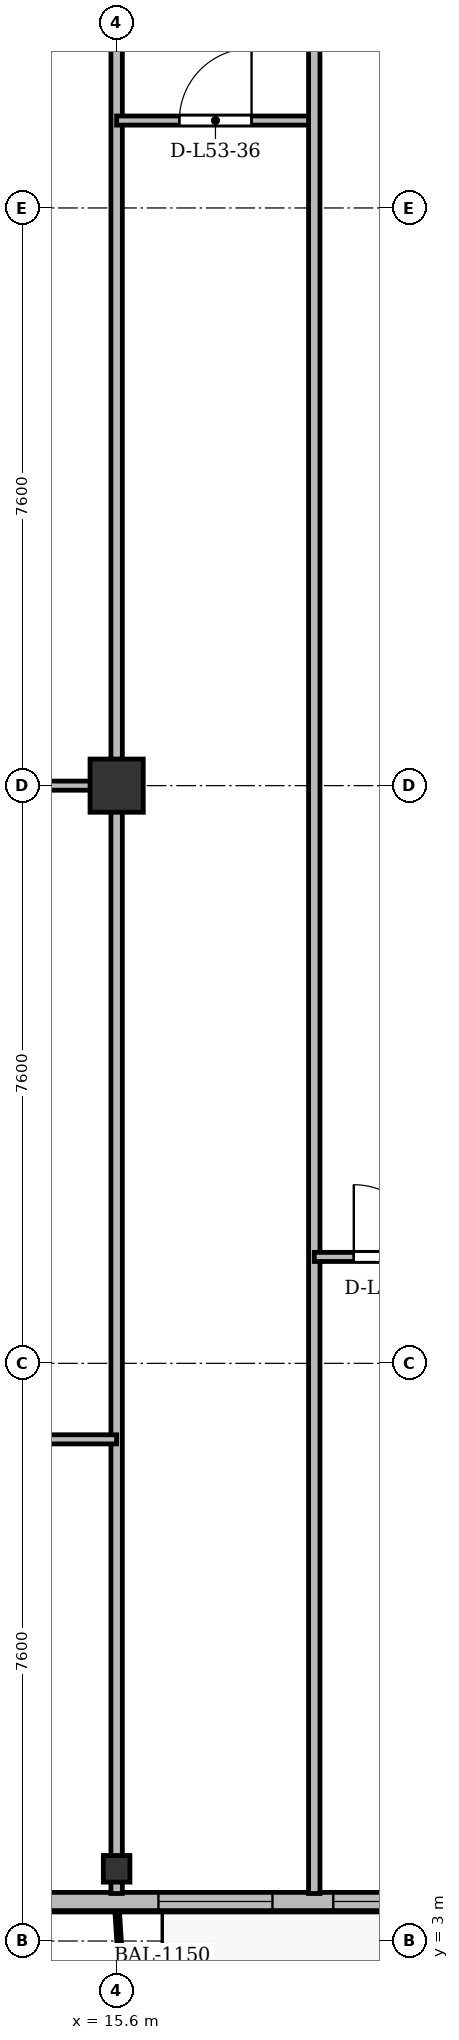
"""IFC4 building model, lengths in metres.
Left out: names, types, materials, properties, quantities, classifications, styles, units other than length and angle.
Written with IfcOpenShell. Run it as: python <this file> out.ifc"""

import sys

from ifc_helpers import new_model, si_unit, direction, frame, frame_2d, origin, origin_2d, place, context, subcontext, project, spatial, rectangle, i_section, extrude, source, transform, mapped, element, fill, save


model = new_model("IFC4")
c1 = context("Model", 3, precision=1e-05, world=origin(), true_north=direction((0.0, 1.0)))
c2 = subcontext(c1, "Body", "Model", "MODEL_VIEW")
j1 = project(units=[si_unit("LENGTHUNIT", "METRE"), si_unit("PLANEANGLEUNIT", "RADIAN")], contexts=[c1])
p1 = place(None, origin())
s1 = spatial("IfcSite", under=j1, at=p1, CompositionType="ELEMENT")
p2 = place(p1, origin())
s2 = spatial("IfcBuilding", under=s1, at=p2, CompositionType="ELEMENT")
p3 = place(p2, frame((0.0, 0.0, 204.9)))
s3 = spatial("IfcBuildingStorey", under=s2, at=p3, CompositionType="ELEMENT", Elevation=204.9)
m1 = source(origin(), c2, "Body", "SweptSolid", [
    extrude(i_section(OverallWidth=0.35, OverallDepth=0.35, WebThickness=0.018, FlangeThickness=0.028, at=origin_2d()), origin(), (0.0, 0.0, 1.0), 3.6),
])
p4 = place(p3, frame((15.6, 3.95, 0.0), z_axis=(0.0, 0.0, 1.0), x_axis=(1.0, 0.0, 0.0)))
e1 = element("IfcColumn", 1, at=p4, inside=s3, PredefinedType="COLUMN", context=c2, shape_type="MappedRepresentation", body=[
    mapped(m1, transform((0.0, 0.0, 0.0), x_axis=(1.0, 0.0, 0.0), y_axis=(0.0, 1.0, 0.0), z_axis=(0.0, 0.0, 1.0), scale=1.0)),
])
m2 = source(origin(), c2, "Body", "SweptSolid", [
    extrude(rectangle(XDim=0.7, YDim=0.7, at=origin_2d()), origin(), (0.0, 0.0, 1.0), 3.6),
])
p5 = place(p3, frame((15.6, 18.2, 0.0), z_axis=(0.0, 0.0, 1.0), x_axis=(1.0, 0.0, 0.0)))
e2 = element("IfcColumn", 2, at=p5, inside=s3, PredefinedType="COLUMN", context=c2, shape_type="MappedRepresentation", body=[
    mapped(m2, transform((0.0, 0.0, 0.0), x_axis=(1.0, 0.0, 0.0), y_axis=(0.0, 1.0, 0.0), z_axis=(0.0, 0.0, 1.0), scale=1.0)),
])
p6 = place(p3, frame((63.4, 3.52, 0.0), z_axis=(0.0, 0.0, 1.0), x_axis=(-1.0, 0.0, 0.0)))
e3 = element("IfcWall", 3, at=p6, inside=s3, PredefinedType="SOLIDWALL", context=c2, shape_type="SweptSolid", body=[
    extrude(rectangle(XDim=52.4, YDim=0.24, at=frame_2d((26.2, 0.0))), origin(), (0.0, 0.0, 1.0), 3.36),
])
p7 = place(p6, frame((1.345, 0.0, 0.9)))
e4 = element("IfcOpeningElement", 4, at=p7, cuts=e3, PredefinedType="OPENING", context=c2, shape_type="SweptSolid", body=[
    extrude(rectangle(XDim=2.0, YDim=1.95, at=frame_2d((1.0, 0.975))), frame((0.0, 0.13, 0.0), z_axis=(0.0, -1.0, 0.0), x_axis=(1.0, 0.0, 0.0)), (0.0, 0.0, 1.0), 0.26),
])
p8 = place(p6, frame((5.075, 0.0, 0.9)))
e5 = element("IfcOpeningElement", 5, at=p8, cuts=e3, PredefinedType="OPENING", context=c2, shape_type="SweptSolid", body=[
    extrude(rectangle(XDim=1.65, YDim=1.85, at=frame_2d((0.825, 0.925))), frame((0.0, 0.13, 0.0), z_axis=(0.0, -1.0, 0.0), x_axis=(1.0, 0.0, 0.0)), (0.0, 0.0, 1.0), 0.26),
])
p9 = place(p6, frame((7.45, 0.0, 0.9)))
e6 = element("IfcOpeningElement", 6, at=p9, cuts=e3, PredefinedType="OPENING", context=c2, shape_type="SweptSolid", body=[
    extrude(rectangle(XDim=1.5, YDim=1.75, at=frame_2d((0.75, 0.875))), frame((0.0, 0.13, 0.0), z_axis=(0.0, -1.0, 0.0), x_axis=(1.0, 0.0, 0.0)), (0.0, 0.0, 1.0), 0.26),
])
p10 = place(p6, frame((9.7, 0.0, 0.9)))
e7 = element("IfcOpeningElement", 7, at=p10, cuts=e3, PredefinedType="OPENING", context=c2, shape_type="SweptSolid", body=[
    extrude(rectangle(XDim=2.2, YDim=1.8, at=frame_2d((1.1, 0.9))), frame((0.0, 0.13, 0.0), z_axis=(0.0, -1.0, 0.0), x_axis=(1.0, 0.0, 0.0)), (0.0, 0.0, 1.0), 0.26),
])
p11 = place(p6, frame((14.217, 0.0, 0.0)))
e8 = element("IfcOpeningElement", 8, at=p11, cuts=e3, PredefinedType="OPENING", context=c2, shape_type="SweptSolid", body=[
    extrude(rectangle(XDim=1.2, YDim=2.2, at=frame_2d((0.6, 1.1))), frame((0.0, 0.13, 0.0), z_axis=(0.0, -1.0, 0.0), x_axis=(1.0, 0.0, 0.0)), (0.0, 0.0, 1.0), 0.26),
])
p12 = place(p6, frame((19.934, 0.0, 0.9)))
e9 = element("IfcOpeningElement", 9, at=p12, cuts=e3, PredefinedType="OPENING", context=c2, shape_type="SweptSolid", body=[
    extrude(rectangle(XDim=2.0, YDim=1.95, at=frame_2d((1.0, 0.975))), frame((0.0, 0.13, 0.0), z_axis=(0.0, -1.0, 0.0), x_axis=(1.0, 0.0, 0.0)), (0.0, 0.0, 1.0), 0.26),
])
p13 = place(p6, frame((22.775, 0.0, 0.9)))
e10 = element("IfcOpeningElement", 10, at=p13, cuts=e3, PredefinedType="OPENING", context=c2, shape_type="SweptSolid", body=[
    extrude(rectangle(XDim=1.65, YDim=1.85, at=frame_2d((0.825, 0.925))), frame((0.0, 0.13, 0.0), z_axis=(0.0, -1.0, 0.0), x_axis=(1.0, 0.0, 0.0)), (0.0, 0.0, 1.0), 0.26),
])
p14 = place(p6, frame((25.367, 0.0, 0.9)))
e11 = element("IfcOpeningElement", 11, at=p14, cuts=e3, PredefinedType="OPENING", context=c2, shape_type="SweptSolid", body=[
    extrude(rectangle(XDim=1.8, YDim=1.8, at=frame_2d((0.9, 0.9))), frame((0.0, 0.13, 0.0), z_axis=(0.0, -1.0, 0.0), x_axis=(1.0, 0.0, 0.0)), (0.0, 0.0, 1.0), 0.26),
])
p15 = place(p6, frame((29.1, 0.0, 0.9)))
e12 = element("IfcOpeningElement", 12, at=p15, cuts=e3, PredefinedType="OPENING", context=c2, shape_type="SweptSolid", body=[
    extrude(rectangle(XDim=2.2, YDim=1.8, at=frame_2d((1.1, 0.9))), frame((0.0, 0.13, 0.0), z_axis=(0.0, -1.0, 0.0), x_axis=(1.0, 0.0, 0.0)), (0.0, 0.0, 1.0), 0.26),
])
p16 = place(p6, frame((33.25, 0.0, 0.9)))
e13 = element("IfcOpeningElement", 13, at=p16, cuts=e3, PredefinedType="OPENING", context=c2, shape_type="SweptSolid", body=[
    extrude(rectangle(XDim=1.5, YDim=1.75, at=frame_2d((0.75, 0.875))), frame((0.0, 0.13, 0.0), z_axis=(0.0, -1.0, 0.0), x_axis=(1.0, 0.0, 0.0)), (0.0, 0.0, 1.0), 0.26),
])
p17 = place(p6, frame((35.65, 0.0, 0.9)))
e14 = element("IfcOpeningElement", 14, at=p17, cuts=e3, PredefinedType="OPENING", context=c2, shape_type="SweptSolid", body=[
    extrude(rectangle(XDim=1.5, YDim=1.75, at=frame_2d((0.75, 0.875))), frame((0.0, 0.13, 0.0), z_axis=(0.0, -1.0, 0.0), x_axis=(1.0, 0.0, 0.0)), (0.0, 0.0, 1.0), 0.26),
])
p18 = place(p6, frame((37.975, 0.0, 0.9)))
e15 = element("IfcOpeningElement", 15, at=p18, cuts=e3, PredefinedType="OPENING", context=c2, shape_type="SweptSolid", body=[
    extrude(rectangle(XDim=1.65, YDim=1.85, at=frame_2d((0.825, 0.925))), frame((0.0, 0.13, 0.0), z_axis=(0.0, -1.0, 0.0), x_axis=(1.0, 0.0, 0.0)), (0.0, 0.0, 1.0), 0.26),
])
p19 = place(p6, frame((41.456, 0.0, 0.0)))
e16 = element("IfcOpeningElement", 16, at=p19, cuts=e3, PredefinedType="OPENING", context=c2, shape_type="SweptSolid", body=[
    extrude(rectangle(XDim=1.2, YDim=2.2, at=frame_2d((0.6, 1.1))), frame((0.0, 0.13, 0.0), z_axis=(0.0, -1.0, 0.0), x_axis=(1.0, 0.0, 0.0)), (0.0, 0.0, 1.0), 0.26),
])
p20 = place(p6, frame((43.45, 0.0, 0.9)))
e17 = element("IfcOpeningElement", 17, at=p20, cuts=e3, PredefinedType="OPENING", context=c2, shape_type="SweptSolid", body=[
    extrude(rectangle(XDim=1.5, YDim=1.75, at=frame_2d((0.75, 0.875))), frame((0.0, 0.13, 0.0), z_axis=(0.0, -1.0, 0.0), x_axis=(1.0, 0.0, 0.0)), (0.0, 0.0, 1.0), 0.26),
])
p21 = place(p6, frame((45.75, 0.0, 0.9)))
e18 = element("IfcOpeningElement", 18, at=p21, cuts=e3, PredefinedType="OPENING", context=c2, shape_type="SweptSolid", body=[
    extrude(rectangle(XDim=1.5, YDim=1.75, at=frame_2d((0.75, 0.875))), frame((0.0, 0.13, 0.0), z_axis=(0.0, -1.0, 0.0), x_axis=(1.0, 0.0, 0.0)), (0.0, 0.0, 1.0), 0.26),
])
p22 = place(p6, frame((49.055, 0.0, 0.9)))
e19 = element("IfcOpeningElement", 19, at=p22, cuts=e3, PredefinedType="OPENING", context=c2, shape_type="SweptSolid", body=[
    extrude(rectangle(XDim=2.0, YDim=1.95, at=frame_2d((1.0, 0.975))), frame((0.0, 0.13, 0.0), z_axis=(0.0, -1.0, 0.0), x_axis=(1.0, 0.0, 0.0)), (0.0, 0.0, 1.0), 0.26),
])
p23 = place(p3, frame((15.6, 3.625, 0.0), z_axis=(0.0, 0.0, 1.0), x_axis=(0.0, 1.0, 0.0)))
e20 = element("IfcWall", 20, at=p23, inside=s3, PredefinedType="PARTITIONING", context=c2, shape_type="SweptSolid", body=[
    extrude(rectangle(XDim=27.175, YDim=0.15, at=frame_2d((13.587, 0.0))), origin(), (0.0, 0.0, 1.0), 2.86),
])
p24 = place(p3, frame((8.24, 18.2, 0.0), z_axis=(0.0, 0.0, 1.0), x_axis=(1.0, 0.0, 0.0)))
e21 = element("IfcWall", 21, at=p24, inside=s3, PredefinedType="PARTITIONING", context=c2, shape_type="SweptSolid", body=[
    extrude(rectangle(XDim=7.36, YDim=0.12, at=frame_2d((3.68, 0.0))), origin(), (0.0, 0.0, 1.0), 2.91),
])
p25 = place(p24, frame((3.114, 0.0, 0.0)))
e22 = element("IfcOpeningElement", 22, at=p25, cuts=e21, PredefinedType="OPENING", context=c2, shape_type="SweptSolid", body=[
    extrude(rectangle(XDim=0.95, YDim=2.15, at=frame_2d((0.475, 1.075))), frame((0.0, 0.07, 0.0), z_axis=(0.0, -1.0, 0.0), x_axis=(1.0, 0.0, 0.0)), (0.0, 0.0, 1.0), 0.14),
])
p26 = place(p3, frame((8.24, 9.6, 0.0), z_axis=(0.0, 0.0, 1.0), x_axis=(1.0, 0.0, 0.0)))
e23 = element("IfcWall", 23, at=p26, inside=s3, PredefinedType="PARTITIONING", context=c2, shape_type="SweptSolid", body=[
    extrude(rectangle(XDim=7.36, YDim=0.12, at=frame_2d((3.68, 0.0))), origin(), (0.0, 0.0, 1.0), 2.86),
])
p27 = place(p26, frame((3.114, 0.0, 0.0)))
e24 = element("IfcOpeningElement", 24, at=p27, cuts=e23, PredefinedType="OPENING", context=c2, shape_type="SweptSolid", body=[
    extrude(rectangle(XDim=0.95, YDim=2.15, at=frame_2d((0.475, 1.075))), frame((0.0, 0.07, 0.0), z_axis=(0.0, -1.0, 0.0), x_axis=(1.0, 0.0, 0.0)), (0.0, 0.0, 1.0), 0.14),
])
p28 = place(p3, frame((15.6, 26.95, 0.0), z_axis=(0.0, 0.0, 1.0), x_axis=(1.0, 0.0, 0.0)))
e25 = element("IfcWall", 25, at=p28, inside=s3, PredefinedType="PARTITIONING", context=c2, shape_type="SweptSolid", body=[
    extrude(rectangle(XDim=2.6, YDim=0.12, at=frame_2d((1.3, 0.0))), origin(), (0.0, 0.0, 1.0), 2.86),
])
p29 = place(p28, frame((0.825, 0.0, 0.0)))
e26 = element("IfcOpeningElement", 26, at=p29, cuts=e25, PredefinedType="OPENING", context=c2, shape_type="SweptSolid", body=[
    extrude(rectangle(XDim=0.95, YDim=2.15, at=frame_2d((0.475, 1.075))), frame((0.0, 0.07, 0.0), z_axis=(0.0, -1.0, 0.0), x_axis=(1.0, 0.0, 0.0)), (0.0, 0.0, 1.0), 0.14),
])
p30 = place(p3, frame((18.2, 3.625, 0.0), z_axis=(0.0, 0.0, 1.0), x_axis=(0.0, 1.0, 0.0)))
e27 = element("IfcWall", 27, at=p30, inside=s3, PredefinedType="PARTITIONING", context=c2, shape_type="SweptSolid", body=[
    extrude(rectangle(XDim=27.175, YDim=0.15, at=frame_2d((13.587, 0.0))), origin(), (0.0, 0.0, 1.0), 2.91),
])
p31 = place(p3, frame((18.2, 12.0, 0.0), z_axis=(0.0, 0.0, 1.0), x_axis=(1.0, 0.0, 0.0)))
e28 = element("IfcWall", 28, at=p31, inside=s3, PredefinedType="PARTITIONING", context=c2, shape_type="SweptSolid", body=[
    extrude(rectangle(XDim=2.0, YDim=0.12, at=frame_2d((1.0, 0.0))), origin(), (0.0, 0.0, 1.0), 3.36),
])
p32 = place(p31, frame((0.52, 0.0, 0.0)))
e29 = element("IfcOpeningElement", 29, at=p32, cuts=e28, PredefinedType="OPENING", context=c2, shape_type="SweptSolid", body=[
    extrude(rectangle(XDim=0.95, YDim=2.15, at=frame_2d((0.475, 1.075))), frame((0.0, 0.07, 0.0), z_axis=(0.0, -1.0, 0.0), x_axis=(1.0, 0.0, 0.0)), (0.0, 0.0, 1.0), 0.14),
])
m3 = source(origin(), c2, "Body", "SweptSolid", [
    extrude(rectangle(XDim=1.5, YDim=1.75, at=frame_2d((0.75, 0.875))), frame((0.0, 0.03, 0.0), z_axis=(0.0, -1.0, 0.0), x_axis=(1.0, 0.0, 0.0)), (0.0, 0.0, 1.0), 0.06),
])
p33 = place(p20, origin())
e30 = element("IfcWindow", 30, at=p33, inside=s3, PartitioningType="SINGLE_PANEL", PredefinedType="WINDOW", context=c2, shape_type="MappedRepresentation", body=[
    mapped(m3, transform((0.0, 0.0, 0.0), x_axis=(1.0, 0.0, 0.0), y_axis=(0.0, 1.0, 0.0), z_axis=(0.0, 0.0, 1.0), scale=1.0)),
])
fill(e17, e30)
p34 = place(p21, origin())
e31 = element("IfcWindow", 31, at=p34, inside=s3, PartitioningType="SINGLE_PANEL", PredefinedType="WINDOW", context=c2, shape_type="MappedRepresentation", body=[
    mapped(m3, transform((0.0, 0.0, 0.0), x_axis=(1.0, 0.0, 0.0), y_axis=(0.0, 1.0, 0.0), z_axis=(0.0, 0.0, 1.0), scale=1.0)),
])
fill(e18, e31)
m4 = source(origin(), c2, "Body", "SweptSolid", [
    extrude(rectangle(XDim=0.95, YDim=2.15, at=frame_2d((0.475, 1.075))), frame((0.0, 0.025, 0.0), z_axis=(0.0, -1.0, 0.0), x_axis=(1.0, 0.0, 0.0)), (0.0, 0.0, 1.0), 0.05),
])
p35 = place(p29, origin())
e32 = element("IfcDoor", 32, at=p35, inside=s3, OperationType="SINGLE_SWING_RIGHT", PredefinedType="DOOR", context=c2, shape_type="MappedRepresentation", body=[
    mapped(m4, transform((0.0, 0.0, 0.0), x_axis=(1.0, 0.0, 0.0), y_axis=(0.0, 1.0, 0.0), z_axis=(0.0, 0.0, 1.0), scale=1.0)),
])
fill(e26, e32)
p36 = place(p32, origin())
e33 = element("IfcDoor", 33, at=p36, inside=s3, OperationType="SINGLE_SWING_LEFT", PredefinedType="DOOR", context=c2, shape_type="MappedRepresentation", body=[
    mapped(m4, transform((0.0, 0.0, 0.0), x_axis=(1.0, 0.0, 0.0), y_axis=(0.0, 1.0, 0.0), z_axis=(0.0, 0.0, 1.0), scale=1.0)),
])
fill(e29, e33)
save(model, sys.argv[1])
